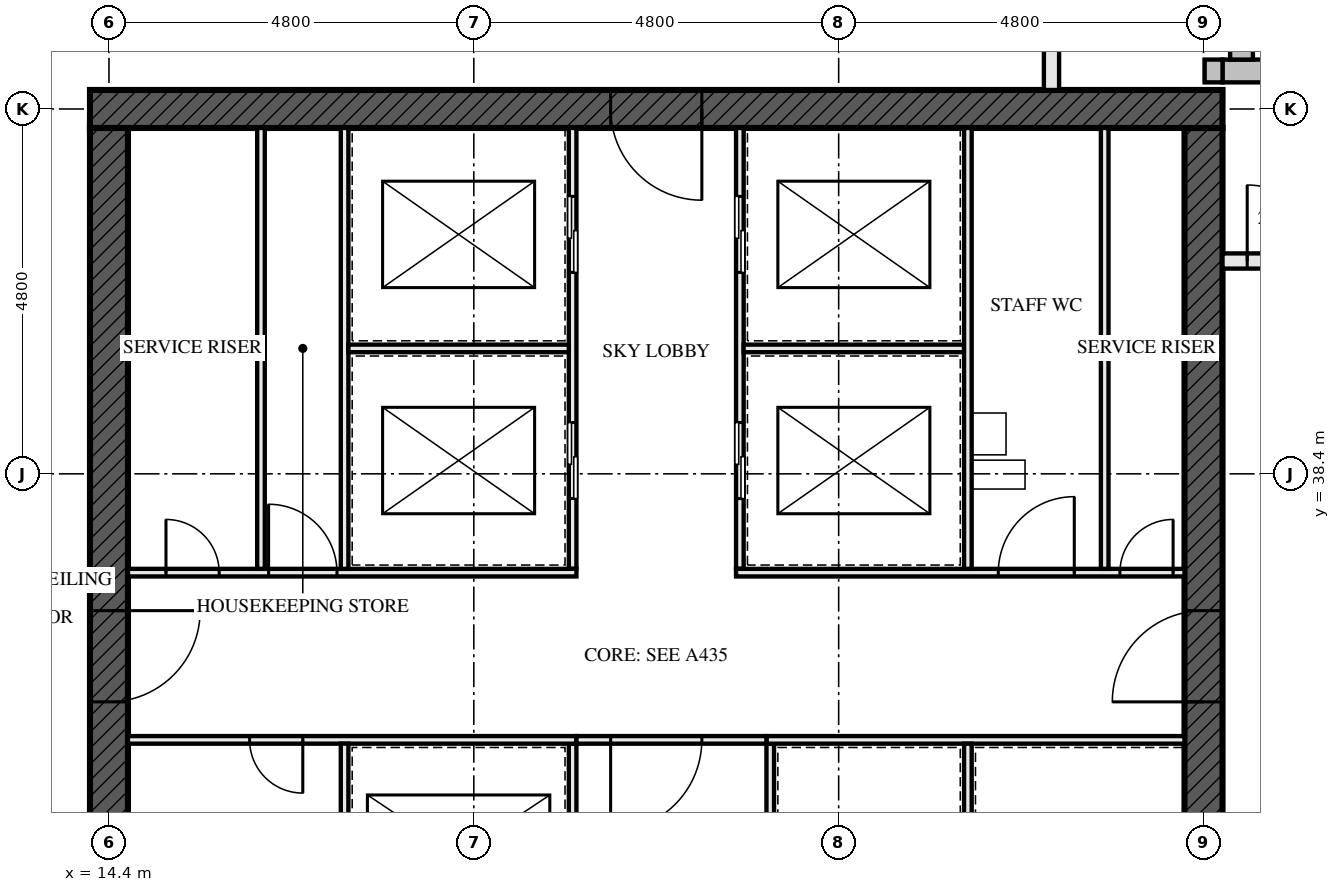
"""IFC4 building model, lengths in metres.
Left out: names, types, materials, properties, quantities, classifications, styles, units other than length and angle.
Written with IfcOpenShell. Run it as: python <this file> out.ifc"""

import sys

from ifc_helpers import new_model, si_unit, direction, frame, frame_2d, origin, place, context, subcontext, project, spatial, rectangle, extrude, element, fill, save


model = new_model("IFC4")
c1 = context("Model", 3, precision=1e-05, world=origin(), true_north=direction((0.0, 1.0)))
c2 = subcontext(c1, "Body", "Model", "MODEL_VIEW")
j1 = project(units=[si_unit("LENGTHUNIT", "METRE"), si_unit("PLANEANGLEUNIT", "RADIAN")], contexts=[c1])
p1 = place(None, origin())
s1 = spatial("IfcSite", under=j1, at=p1, CompositionType="ELEMENT")
p2 = place(p1, origin())
s2 = spatial("IfcBuilding", under=s1, at=p2, CompositionType="ELEMENT")
p3 = place(p2, frame((0.0, 0.0, 84.0)))
s3 = spatial("IfcBuildingStorey", under=s2, at=p3, CompositionType="ELEMENT", Elevation=84.0)
p4 = place(p3, frame((29.05, 43.2, -0.17), z_axis=(0.0, 0.0, 1.0), x_axis=(-1.0, 0.0, 0.0)))
e1 = element("IfcWall", 1, at=p4, inside=s3, PredefinedType="SHEAR", context=c2, shape_type="SweptSolid", body=[
    extrude(rectangle(XDim=14.9, YDim=0.5, at=frame_2d((7.45, 0.0))), origin(), (0.0, 0.0, 1.0), 3.5),
])
p5 = place(p4, frame((6.85, 0.0, 0.17)))
e2 = element("IfcOpeningElement", 2, at=p5, cuts=e1, PredefinedType="OPENING", context=c2, shape_type="SweptSolid", body=[
    extrude(rectangle(XDim=1.2, YDim=2.1, at=frame_2d((0.6, 1.05))), frame((0.0, 0.26, 0.0), z_axis=(0.0, -1.0, 0.0), x_axis=(1.0, 0.0, 0.0)), (0.0, 0.0, 1.0), 0.521),
])
p6 = place(p3, frame((14.4, 42.95, -0.17), z_axis=(0.0, 0.0, 1.0), x_axis=(0.0, -1.0, 0.0)))
e3 = element("IfcWall", 3, at=p6, inside=s3, PredefinedType="SHEAR", context=c2, shape_type="SweptSolid", body=[
    extrude(rectangle(XDim=13.9, YDim=0.5, at=frame_2d((6.95, 0.0))), origin(), (0.0, 0.0, 1.0), 3.5),
])
p7 = place(p6, frame((6.35, 0.0, 0.17)))
e4 = element("IfcOpeningElement", 4, at=p7, cuts=e3, PredefinedType="OPENING", context=c2, shape_type="SweptSolid", body=[
    extrude(rectangle(XDim=1.2, YDim=2.1, at=frame_2d((0.6, 1.05))), frame((0.0, 0.26, 0.0), z_axis=(0.0, -1.0, 0.0), x_axis=(1.0, 0.0, 0.0)), (0.0, 0.0, 1.0), 0.521),
])
p8 = place(p3, frame((28.8, 29.05, -0.17), z_axis=(0.0, 0.0, 1.0), x_axis=(0.0, 1.0, 0.0)))
e5 = element("IfcWall", 5, at=p8, inside=s3, PredefinedType="SHEAR", context=c2, shape_type="SweptSolid", body=[
    extrude(rectangle(XDim=13.9, YDim=0.5, at=frame_2d((6.95, 0.0))), origin(), (0.0, 0.0, 1.0), 3.5),
])
p9 = place(p8, frame((6.35, 0.0, 0.17)))
e6 = element("IfcOpeningElement", 6, at=p9, cuts=e5, PredefinedType="OPENING", context=c2, shape_type="SweptSolid", body=[
    extrude(rectangle(XDim=1.2, YDim=2.1, at=frame_2d((0.6, 1.05))), frame((0.0, 0.26, 0.0), z_axis=(0.0, -1.0, 0.0), x_axis=(1.0, 0.0, 0.0)), (0.0, 0.0, 1.0), 0.521),
])
p10 = place(p3, frame((38.75, 43.7, 0.0), z_axis=(0.0, 0.0, 1.0), x_axis=(-1.0, 0.0, 0.0)))
e7 = element("IfcWall", 7, at=p10, inside=s3, PredefinedType="SOLIDWALL", context=c2, shape_type="SweptSolid", body=[
    extrude(rectangle(XDim=9.7, YDim=0.3, at=frame_2d((4.85, 0.0))), origin(), (0.0, 0.0, 1.0), 3.5),
])
p11 = place(p10, frame((2.25, 0.0, 0.0)))
e8 = element("IfcOpeningElement", 8, at=p11, cuts=e7, PredefinedType="OPENING", context=c2, shape_type="SweptSolid", body=[
    extrude(rectangle(XDim=1.0, YDim=2.4, at=frame_2d((0.5, 1.2))), frame((0.0, 0.161, 0.0), z_axis=(0.0, -1.0, 0.0), x_axis=(1.0, 0.0, 0.0)), (0.0, 0.0, 1.0), 0.321),
])
p12 = place(p10, frame((6.35, 0.0, 0.6)))
e9 = element("IfcOpeningElement", 9, at=p12, cuts=e7, PredefinedType="OPENING", context=c2, shape_type="SweptSolid", body=[
    extrude(rectangle(XDim=2.4, YDim=1.8, at=frame_2d((1.2, 0.9))), frame((0.0, 0.161, 0.0), z_axis=(0.0, -1.0, 0.0), x_axis=(1.0, 0.0, 0.0)), (0.0, 0.0, 1.0), 0.321),
])
p13 = place(p3, frame((29.3, 43.85, 0.0), z_axis=(0.0, 0.0, 1.0), x_axis=(0.0, 1.0, 0.0)))
e10 = element("IfcWall", 10, at=p13, inside=s3, PredefinedType="SOLIDWALL", context=c2, shape_type="SweptSolid", body=[
    extrude(rectangle(XDim=9.6, YDim=0.3, at=frame_2d((4.8, 0.0))), origin(), (0.0, 0.0, 1.0), 3.5),
])
p14 = place(p13, frame((6.05, 0.0, 0.0)))
e11 = element("IfcOpeningElement", 11, at=p14, cuts=e10, PredefinedType="OPENING", context=c2, shape_type="SweptSolid", body=[
    extrude(rectangle(XDim=1.0, YDim=2.4, at=frame_2d((0.5, 1.2))), frame((0.0, 0.161, 0.0), z_axis=(0.0, -1.0, 0.0), x_axis=(1.0, 0.0, 0.0)), (0.0, 0.0, 1.0), 0.321),
])
p15 = place(p13, frame((0.55, 0.0, 0.6)))
e12 = element("IfcOpeningElement", 12, at=p15, cuts=e10, PredefinedType="OPENING", context=c2, shape_type="SweptSolid", body=[
    extrude(rectangle(XDim=2.4, YDim=1.8, at=frame_2d((1.2, 0.9))), frame((0.0, 0.161, 0.0), z_axis=(0.0, -1.0, 0.0), x_axis=(1.0, 0.0, 0.0)), (0.0, 0.0, 1.0), 0.321),
])
p16 = place(p3, frame((29.05, 43.7, 2.39), z_axis=(0.0, 0.0, 1.0), x_axis=(-1.0, 0.0, 0.0)))
e13 = element("IfcWall", 13, at=p16, inside=s3, PredefinedType="SOLIDWALL", context=c2, shape_type="SweptSolid", body=[
    extrude(rectangle(XDim=0.235, YDim=0.3, at=frame_2d((0.118, 0.0))), origin(), (0.0, 0.0, 1.0), 0.88),
])
for number, where, z_axis, x_axis in (
    (14, (16.4, 37.15, 0.0), (0.0, 0.0, 1.0), (0.0, 1.0, 0.0)),
    (15, (27.5, 37.15, 0.0), (0.0, 0.0, 1.0), (0.0, 1.0, 0.0)),
):
    element("IfcWall", number, at=place(p3, frame(where, z_axis=z_axis, x_axis=x_axis)), inside=s3, PredefinedType="SOLIDWALL", context=c2, shape_type="SweptSolid", body=[
        extrude(rectangle(XDim=5.8, YDim=0.1, at=frame_2d((2.9, 0.0))), origin(), (0.0, 0.0, 1.0), 3.33),
    ])
p17 = place(p3, frame((20.5, 29.05, 0.0), z_axis=(0.0, 0.0, 1.0), x_axis=(0.0, 1.0, 0.0)))
e16 = element("IfcWall", 16, at=p17, inside=s3, PredefinedType="SOLIDWALL", context=c2, shape_type="SweptSolid", body=[
    extrude(rectangle(XDim=5.8, YDim=0.1, at=frame_2d((2.9, 0.0))), origin(), (0.0, 0.0, 1.0), 3.33),
])
p18 = place(p17, frame((0.8, 0.0, 0.0)))
e17 = element("IfcOpeningElement", 17, at=p18, cuts=e16, PredefinedType="OPENING", context=c2, shape_type="SweptSolid", body=[
    extrude(rectangle(XDim=1.1, YDim=2.3, at=frame_2d((0.55, 1.15))), frame((0.0, 0.061, 0.0), z_axis=(0.0, -1.0, 0.0), x_axis=(1.0, 0.0, 0.0)), (0.0, 0.0, 1.0), 0.121),
])
p19 = place(p17, frame((3.775, 0.0, 0.0)))
e18 = element("IfcOpeningElement", 18, at=p19, cuts=e16, PredefinedType="OPENING", context=c2, shape_type="SweptSolid", body=[
    extrude(rectangle(XDim=1.1, YDim=2.3, at=frame_2d((0.55, 1.15))), frame((0.0, 0.061, 0.0), z_axis=(0.0, -1.0, 0.0), x_axis=(1.0, 0.0, 0.0)), (0.0, 0.0, 1.0), 0.121),
])
p20 = place(p3, frame((20.5, 37.15, 0.0), z_axis=(0.0, 0.0, 1.0), x_axis=(0.0, 1.0, 0.0)))
e19 = element("IfcWall", 19, at=p20, inside=s3, PredefinedType="SOLIDWALL", context=c2, shape_type="SweptSolid", body=[
    extrude(rectangle(XDim=5.8, YDim=0.1, at=frame_2d((2.9, 0.0))), origin(), (0.0, 0.0, 1.0), 3.33),
])
p21 = place(p20, frame((0.925, 0.0, 0.0)))
e20 = element("IfcOpeningElement", 20, at=p21, cuts=e19, PredefinedType="OPENING", context=c2, shape_type="SweptSolid", body=[
    extrude(rectangle(XDim=1.0, YDim=2.1, at=frame_2d((0.5, 1.05))), frame((0.0, 0.061, 0.0), z_axis=(0.0, -1.0, 0.0), x_axis=(1.0, 0.0, 0.0)), (0.0, 0.0, 1.0), 0.121),
])
p22 = place(p20, frame((3.9, 0.0, 0.0)))
e21 = element("IfcOpeningElement", 21, at=p22, cuts=e19, PredefinedType="OPENING", context=c2, shape_type="SweptSolid", body=[
    extrude(rectangle(XDim=1.0, YDim=2.1, at=frame_2d((0.5, 1.05))), frame((0.0, 0.061, 0.0), z_axis=(0.0, -1.0, 0.0), x_axis=(1.0, 0.0, 0.0)), (0.0, 0.0, 1.0), 0.121),
])
p23 = place(p3, frame((22.7, 37.15, 0.0), z_axis=(0.0, 0.0, 1.0), x_axis=(0.0, 1.0, 0.0)))
e22 = element("IfcWall", 22, at=p23, inside=s3, PredefinedType="SOLIDWALL", context=c2, shape_type="SweptSolid", body=[
    extrude(rectangle(XDim=5.8, YDim=0.1, at=frame_2d((2.9, 0.0))), origin(), (0.0, 0.0, 1.0), 3.33),
])
p24 = place(p23, frame((0.925, 0.0, 0.0)))
e23 = element("IfcOpeningElement", 23, at=p24, cuts=e22, PredefinedType="OPENING", context=c2, shape_type="SweptSolid", body=[
    extrude(rectangle(XDim=1.0, YDim=2.1, at=frame_2d((0.5, 1.05))), frame((0.0, 0.061, 0.0), z_axis=(0.0, -1.0, 0.0), x_axis=(1.0, 0.0, 0.0)), (0.0, 0.0, 1.0), 0.121),
])
p25 = place(p23, frame((3.9, 0.0, 0.0)))
e24 = element("IfcOpeningElement", 24, at=p25, cuts=e22, PredefinedType="OPENING", context=c2, shape_type="SweptSolid", body=[
    extrude(rectangle(XDim=1.0, YDim=2.1, at=frame_2d((0.5, 1.05))), frame((0.0, 0.061, 0.0), z_axis=(0.0, -1.0, 0.0), x_axis=(1.0, 0.0, 0.0)), (0.0, 0.0, 1.0), 0.121),
])
p26 = place(p3, frame((23.1, 29.05, 0.0), z_axis=(0.0, 0.0, 1.0), x_axis=(0.0, 1.0, 0.0)))
e25 = element("IfcWall", 25, at=p26, inside=s3, PredefinedType="SOLIDWALL", context=c2, shape_type="SweptSolid", body=[
    extrude(rectangle(XDim=5.8, YDim=0.1, at=frame_2d((2.9, 0.0))), origin(), (0.0, 0.0, 1.0), 3.33),
])
p27 = place(p26, frame((1.0, 0.0, 0.0)))
e26 = element("IfcOpeningElement", 26, at=p27, cuts=e25, PredefinedType="OPENING", context=c2, shape_type="SweptSolid", body=[
    extrude(rectangle(XDim=0.7, YDim=2.1, at=frame_2d((0.35, 1.05))), frame((0.0, 0.061, 0.0), z_axis=(0.0, -1.0, 0.0), x_axis=(1.0, 0.0, 0.0)), (0.0, 0.0, 1.0), 0.121),
])
p28 = place(p3, frame((14.65, 34.9, 0.0), z_axis=(0.0, 0.0, 1.0), x_axis=(1.0, 0.0, 0.0)))
e27 = element("IfcWall", 27, at=p28, inside=s3, PredefinedType="SOLIDWALL", context=c2, shape_type="SweptSolid", body=[
    extrude(rectangle(XDim=5.9, YDim=0.1, at=frame_2d((2.95, 0.0))), origin(), (0.0, 0.0, 1.0), 3.33),
])
p29 = place(p28, frame((1.6, 0.0, 0.0)))
e28 = element("IfcOpeningElement", 28, at=p29, cuts=e27, PredefinedType="OPENING", context=c2, shape_type="SweptSolid", body=[
    extrude(rectangle(XDim=0.7, YDim=2.1, at=frame_2d((0.35, 1.05))), frame((0.0, 0.061, 0.0), z_axis=(0.0, -1.0, 0.0), x_axis=(1.0, 0.0, 0.0)), (0.0, 0.0, 1.0), 0.121),
])
p30 = place(p3, frame((23.05, 34.9, 0.0), z_axis=(0.0, 0.0, 1.0), x_axis=(1.0, 0.0, 0.0)))
e29 = element("IfcWall", 29, at=p30, inside=s3, PredefinedType="SOLIDWALL", context=c2, shape_type="SweptSolid", body=[
    extrude(rectangle(XDim=5.5, YDim=0.1, at=frame_2d((2.75, 0.0))), origin(), (0.0, 0.0, 1.0), 3.33),
])
p31 = place(p3, frame((14.65, 37.1, 0.0), z_axis=(0.0, 0.0, 1.0), x_axis=(1.0, 0.0, 0.0)))
e30 = element("IfcWall", 30, at=p31, inside=s3, PredefinedType="SOLIDWALL", context=c2, shape_type="SweptSolid", body=[
    extrude(rectangle(XDim=5.9, YDim=0.1, at=frame_2d((2.95, 0.0))), origin(), (0.0, 0.0, 1.0), 3.33),
])
p32 = place(p31, frame((0.5, 0.0, 0.0)))
e31 = element("IfcOpeningElement", 31, at=p32, cuts=e30, PredefinedType="OPENING", context=c2, shape_type="SweptSolid", body=[
    extrude(rectangle(XDim=0.7, YDim=2.1, at=frame_2d((0.35, 1.05))), frame((0.0, 0.061, 0.0), z_axis=(0.0, -1.0, 0.0), x_axis=(1.0, 0.0, 0.0)), (0.0, 0.0, 1.0), 0.121),
])
p33 = place(p31, frame((1.85, 0.0, 0.0)))
e32 = element("IfcOpeningElement", 32, at=p33, cuts=e30, PredefinedType="OPENING", context=c2, shape_type="SweptSolid", body=[
    extrude(rectangle(XDim=0.9, YDim=2.1, at=frame_2d((0.45, 1.05))), frame((0.0, 0.061, 0.0), z_axis=(0.0, -1.0, 0.0), x_axis=(1.0, 0.0, 0.0)), (0.0, 0.0, 1.0), 0.121),
])
p34 = place(p3, frame((22.65, 37.1, 0.0), z_axis=(0.0, 0.0, 1.0), x_axis=(1.0, 0.0, 0.0)))
e33 = element("IfcWall", 33, at=p34, inside=s3, PredefinedType="SOLIDWALL", context=c2, shape_type="SweptSolid", body=[
    extrude(rectangle(XDim=5.9, YDim=0.1, at=frame_2d((2.95, 0.0))), origin(), (0.0, 0.0, 1.0), 3.33),
])
p35 = place(p34, frame((3.45, 0.0, 0.0)))
e34 = element("IfcOpeningElement", 34, at=p35, cuts=e33, PredefinedType="OPENING", context=c2, shape_type="SweptSolid", body=[
    extrude(rectangle(XDim=1.0, YDim=2.1, at=frame_2d((0.5, 1.05))), frame((0.0, 0.061, 0.0), z_axis=(0.0, -1.0, 0.0), x_axis=(1.0, 0.0, 0.0)), (0.0, 0.0, 1.0), 0.121),
])
p36 = place(p34, frame((5.05, 0.0, 0.0)))
e35 = element("IfcOpeningElement", 35, at=p36, cuts=e33, PredefinedType="OPENING", context=c2, shape_type="SweptSolid", body=[
    extrude(rectangle(XDim=0.7, YDim=2.1, at=frame_2d((0.35, 1.05))), frame((0.0, 0.061, 0.0), z_axis=(0.0, -1.0, 0.0), x_axis=(1.0, 0.0, 0.0)), (0.0, 0.0, 1.0), 0.121),
])
p37 = place(p3, frame((20.55, 34.9, 0.0), z_axis=(0.0, 0.0, 1.0), x_axis=(1.0, 0.0, 0.0)))
e36 = element("IfcWall", 36, at=p37, inside=s3, PredefinedType="SOLIDWALL", context=c2, shape_type="SweptSolid", body=[
    extrude(rectangle(XDim=2.5, YDim=0.1, at=frame_2d((1.25, 0.0))), origin(), (0.0, 0.0, 1.0), 3.33),
])
p38 = place(p37, frame((0.45, 0.0, 0.0)))
e37 = element("IfcOpeningElement", 37, at=p38, cuts=e36, PredefinedType="OPENING", context=c2, shape_type="SweptSolid", body=[
    extrude(rectangle(XDim=1.2, YDim=2.1, at=frame_2d((0.6, 1.05))), frame((0.0, 0.061, 0.0), z_axis=(0.0, -1.0, 0.0), x_axis=(1.0, 0.0, 0.0)), (0.0, 0.0, 1.0), 0.121),
])
for number, where, z_axis, x_axis in (
    (38, (17.5, 29.05, 0.0), (0.0, 0.0, 1.0), (0.0, 1.0, 0.0)),
    (39, (17.5, 37.15, 0.0), (0.0, 0.0, 1.0), (0.0, 1.0, 0.0)),
):
    element("IfcWall", number, at=place(p3, frame(where, z_axis=z_axis, x_axis=x_axis)), inside=s3, PredefinedType="SOLIDWALL", context=c2, shape_type="SweptSolid", body=[
        extrude(rectangle(XDim=5.8, YDim=0.1, at=frame_2d((2.9, 0.0))), origin(), (0.0, 0.0, 1.0), 3.33),
    ])
for number, where, z_axis, x_axis in (
    (40, (17.55, 40.05, 0.0), (0.0, 0.0, 1.0), (1.0, 0.0, 0.0)),
    (41, (22.75, 40.05, 0.0), (0.0, 0.0, 1.0), (1.0, 0.0, 0.0)),
):
    element("IfcWall", number, at=place(p3, frame(where, z_axis=z_axis, x_axis=x_axis)), inside=s3, PredefinedType="SOLIDWALL", context=c2, shape_type="SweptSolid", body=[
        extrude(rectangle(XDim=2.9, YDim=0.1, at=frame_2d((1.45, 0.0))), origin(), (0.0, 0.0, 1.0), 3.33),
    ])
p39 = place(p3, frame((25.7, 37.15, 0.0), z_axis=(0.0, 0.0, 1.0), x_axis=(0.0, 1.0, 0.0)))
e42 = element("IfcWall", 42, at=p39, inside=s3, PredefinedType="SOLIDWALL", context=c2, shape_type="SweptSolid", body=[
    extrude(rectangle(XDim=5.8, YDim=0.1, at=frame_2d((2.9, 0.0))), origin(), (0.0, 0.0, 1.0), 3.33),
])
p40 = place(p3, frame((25.7, 31.95, 0.0), z_axis=(0.0, 0.0, 1.0), x_axis=(0.0, 1.0, 0.0)))
e43 = element("IfcWall", 43, at=p40, inside=s3, PredefinedType="SOLIDWALL", context=c2, shape_type="SweptSolid", body=[
    extrude(rectangle(XDim=2.9, YDim=0.1, at=frame_2d((1.45, 0.0))), origin(), (0.0, 0.0, 1.0), 3.33),
])
p41 = place(p3, frame((26.8, 45.7, 0.0), z_axis=(0.0, 0.0, 1.0), x_axis=(0.0, -1.0, 0.0)))
e44 = element("IfcWall", 44, at=p41, inside=s3, PredefinedType="PARTITIONING", context=c2, shape_type="SweptSolid", body=[
    extrude(rectangle(XDim=2.25, YDim=0.2, at=frame_2d((1.125, 0.0))), origin(), (0.0, 0.0, 1.0), 3.33),
])
p42 = place(p41, frame((0.625, 0.0, 0.0)))
e45 = element("IfcOpeningElement", 45, at=p42, cuts=e44, PredefinedType="OPENING", context=c2, shape_type="SweptSolid", body=[
    extrude(rectangle(XDim=1.0, YDim=2.1, at=frame_2d((0.5, 1.05))), frame((0.0, 0.111, 0.0), z_axis=(0.0, -1.0, 0.0), x_axis=(1.0, 0.0, 0.0)), (0.0, 0.0, 1.0), 0.221),
])
p43 = place(p3, frame((30.7, 41.2, 0.0), z_axis=(0.0, 0.0, 1.0), x_axis=(-1.0, 0.0, 0.0)))
e46 = element("IfcWall", 46, at=p43, inside=s3, PredefinedType="PARTITIONING", context=c2, shape_type="SweptSolid", body=[
    extrude(rectangle(XDim=1.65, YDim=0.2, at=frame_2d((0.825, 0.0))), origin(), (0.0, 0.0, 1.0), 3.33),
])
p44 = place(p43, frame((0.325, 0.0, 0.0)))
e47 = element("IfcOpeningElement", 47, at=p44, cuts=e46, PredefinedType="OPENING", context=c2, shape_type="SweptSolid", body=[
    extrude(rectangle(XDim=1.0, YDim=2.1, at=frame_2d((0.5, 1.05))), frame((0.0, 0.111, 0.0), z_axis=(0.0, -1.0, 0.0), x_axis=(1.0, 0.0, 0.0)), (0.0, 0.0, 1.0), 0.221),
])
p45 = place(p21, origin())
e48 = element("IfcDoor", 48, at=p45, inside=s3, OperationType="SLIDING_TO_LEFT", PredefinedType="DOOR", context=c2, shape_type="SweptSolid", body=[
    extrude(rectangle(XDim=1.0, YDim=2.1, at=frame_2d((0.5, 1.05))), frame((0.0, 0.05, 0.0), z_axis=(0.0, -1.0, 0.0), x_axis=(1.0, 0.0, 0.0)), (0.0, 0.0, 1.0), 0.1),
])
fill(e20, e48)
p46 = place(p22, origin())
e49 = element("IfcDoor", 49, at=p46, inside=s3, OperationType="SLIDING_TO_LEFT", PredefinedType="DOOR", context=c2, shape_type="SweptSolid", body=[
    extrude(rectangle(XDim=1.0, YDim=2.1, at=frame_2d((0.5, 1.05))), frame((0.0, 0.05, 0.0), z_axis=(0.0, -1.0, 0.0), x_axis=(1.0, 0.0, 0.0)), (0.0, 0.0, 1.0), 0.1),
])
fill(e21, e49)
p47 = place(p24, origin())
e50 = element("IfcDoor", 50, at=p47, inside=s3, OperationType="SLIDING_TO_LEFT", PredefinedType="DOOR", context=c2, shape_type="SweptSolid", body=[
    extrude(rectangle(XDim=1.0, YDim=2.1, at=frame_2d((0.5, 1.05))), frame((0.0, 0.05, 0.0), z_axis=(0.0, -1.0, 0.0), x_axis=(1.0, 0.0, 0.0)), (0.0, 0.0, 1.0), 0.1),
])
fill(e23, e50)
p48 = place(p25, origin())
e51 = element("IfcDoor", 51, at=p48, inside=s3, OperationType="SLIDING_TO_LEFT", PredefinedType="DOOR", context=c2, shape_type="SweptSolid", body=[
    extrude(rectangle(XDim=1.0, YDim=2.1, at=frame_2d((0.5, 1.05))), frame((0.0, 0.05, 0.0), z_axis=(0.0, -1.0, 0.0), x_axis=(1.0, 0.0, 0.0)), (0.0, 0.0, 1.0), 0.1),
])
fill(e24, e51)
p49 = place(p29, frame((0.7, 0.0, 0.0), z_axis=(0.0, 0.0, 1.0), x_axis=(-1.0, 0.0, 0.0)))
e52 = element("IfcDoor", 52, at=p49, inside=s3, OperationType="SINGLE_SWING_RIGHT", PredefinedType="DOOR", context=c2, shape_type="SweptSolid", body=[
    extrude(rectangle(XDim=0.7, YDim=2.1, at=frame_2d((0.35, 1.05))), frame((0.0, 0.027, 0.0), z_axis=(0.0, -1.0, 0.0), x_axis=(1.0, 0.0, 0.0)), (0.0, 0.0, 1.0), 0.054),
])
fill(e28, e52)
p50 = place(p32, origin())
e53 = element("IfcDoor", 53, at=p50, inside=s3, OperationType="SINGLE_SWING_RIGHT", PredefinedType="DOOR", context=c2, shape_type="SweptSolid", body=[
    extrude(rectangle(XDim=0.7, YDim=2.1, at=frame_2d((0.35, 1.05))), frame((0.0, 0.027, 0.0), z_axis=(0.0, -1.0, 0.0), x_axis=(1.0, 0.0, 0.0)), (0.0, 0.0, 1.0), 0.054),
])
fill(e31, e53)
p51 = place(p33, origin())
e54 = element("IfcDoor", 54, at=p51, inside=s3, OperationType="SINGLE_SWING_RIGHT", PredefinedType="DOOR", context=c2, shape_type="SweptSolid", body=[
    extrude(rectangle(XDim=0.9, YDim=2.1, at=frame_2d((0.45, 1.05))), frame((0.0, 0.027, 0.0), z_axis=(0.0, -1.0, 0.0), x_axis=(1.0, 0.0, 0.0)), (0.0, 0.0, 1.0), 0.054),
])
fill(e32, e54)
p52 = place(p35, origin())
e55 = element("IfcDoor", 55, at=p52, inside=s3, OperationType="SINGLE_SWING_LEFT", PredefinedType="DOOR", context=c2, shape_type="SweptSolid", body=[
    extrude(rectangle(XDim=1.0, YDim=2.1, at=frame_2d((0.5, 1.05))), frame((0.0, 0.027, 0.0), z_axis=(0.0, -1.0, 0.0), x_axis=(1.0, 0.0, 0.0)), (0.0, 0.0, 1.0), 0.054),
])
fill(e34, e55)
p53 = place(p36, origin())
e56 = element("IfcDoor", 56, at=p53, inside=s3, OperationType="SINGLE_SWING_LEFT", PredefinedType="DOOR", context=c2, shape_type="SweptSolid", body=[
    extrude(rectangle(XDim=0.7, YDim=2.1, at=frame_2d((0.35, 1.05))), frame((0.0, 0.027, 0.0), z_axis=(0.0, -1.0, 0.0), x_axis=(1.0, 0.0, 0.0)), (0.0, 0.0, 1.0), 0.054),
])
fill(e35, e56)
p54 = place(p38, frame((1.2, 0.0, 0.0), z_axis=(0.0, 0.0, 1.0), x_axis=(-1.0, 0.0, 0.0)))
e57 = element("IfcDoor", 57, at=p54, inside=s3, OperationType="SINGLE_SWING_LEFT", PredefinedType="DOOR", context=c2, shape_type="SweptSolid", body=[
    extrude(rectangle(XDim=1.2, YDim=2.1, at=frame_2d((0.6, 1.05))), frame((0.0, 0.027, 0.0), z_axis=(0.0, -1.0, 0.0), x_axis=(1.0, 0.0, 0.0)), (0.0, 0.0, 1.0), 0.054),
])
fill(e37, e57)
p55 = place(p44, frame((1.0, 0.0, 0.0), z_axis=(0.0, 0.0, 1.0), x_axis=(-1.0, 0.0, 0.0)))
e58 = element("IfcDoor", 58, at=p55, inside=s3, OperationType="SINGLE_SWING_RIGHT", PredefinedType="DOOR", context=c2, shape_type="SweptSolid", body=[
    extrude(rectangle(XDim=1.0, YDim=2.1, at=frame_2d((0.5, 1.05))), frame((0.0, 0.027, 0.0), z_axis=(0.0, -1.0, 0.0), x_axis=(1.0, 0.0, 0.0)), (0.0, 0.0, 1.0), 0.054),
])
fill(e47, e58)
p56 = place(p7, origin())
e59 = element("IfcDoor", 59, at=p56, inside=s3, OperationType="SINGLE_SWING_LEFT", PredefinedType="DOOR", context=c2, shape_type="SweptSolid", body=[
    extrude(rectangle(XDim=1.2, YDim=2.1, at=frame_2d((0.6, 1.05))), frame((0.0, 0.027, 0.0), z_axis=(0.0, -1.0, 0.0), x_axis=(1.0, 0.0, 0.0)), (0.0, 0.0, 1.0), 0.054),
])
fill(e4, e59)
p57 = place(p9, origin())
e60 = element("IfcDoor", 60, at=p57, inside=s3, OperationType="SINGLE_SWING_LEFT", PredefinedType="DOOR", context=c2, shape_type="SweptSolid", body=[
    extrude(rectangle(XDim=1.2, YDim=2.1, at=frame_2d((0.6, 1.05))), frame((0.0, 0.027, 0.0), z_axis=(0.0, -1.0, 0.0), x_axis=(1.0, 0.0, 0.0)), (0.0, 0.0, 1.0), 0.054),
])
fill(e6, e60)
p58 = place(p5, origin())
e61 = element("IfcDoor", 61, at=p58, inside=s3, OperationType="SINGLE_SWING_LEFT", PredefinedType="DOOR", context=c2, shape_type="SweptSolid", body=[
    extrude(rectangle(XDim=1.2, YDim=2.1, at=frame_2d((0.6, 1.05))), frame((0.0, 0.027, 0.0), z_axis=(0.0, -1.0, 0.0), x_axis=(1.0, 0.0, 0.0)), (0.0, 0.0, 1.0), 0.054),
])
fill(e2, e61)
save(model, sys.argv[1])
